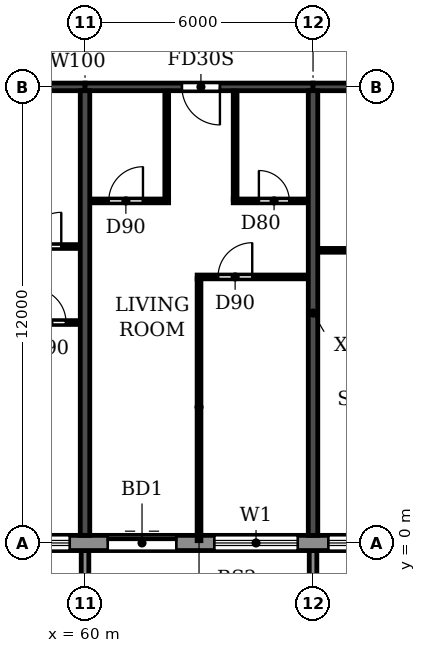
"""IFC4 building model, lengths in metres.
Left out: names, types, materials, properties, quantities, classifications, styles, units other than length and angle.
Written with IfcOpenShell. Run it as: python <this file> out.ifc"""

import sys

from ifc_helpers import new_model, si_unit, direction, frame, frame_2d, origin, place, context, subcontext, project, spatial, polyline, rectangle, outline, extrude, source, transform, mapped, element, fill, save


model = new_model("IFC4")
c1 = context("Model", 3, precision=1e-05, world=origin(), true_north=direction((0.0, 1.0)))
c2 = subcontext(c1, "Body", "Model", "MODEL_VIEW")
j1 = project(units=[si_unit("LENGTHUNIT", "METRE"), si_unit("PLANEANGLEUNIT", "RADIAN")], contexts=[c1])
p1 = place(None, origin())
s1 = spatial("IfcSite", under=j1, at=p1, CompositionType="ELEMENT")
p2 = place(p1, origin())
s2 = spatial("IfcBuilding", under=s1, at=p2, CompositionType="ELEMENT")
p3 = place(p2, frame((0.0, 0.0, 241.2)))
s3 = spatial("IfcBuildingStorey", under=s2, at=p3, CompositionType="ELEMENT", Elevation=241.2)
for number, where, z_axis, x_axis in (
    (1, (60.0, 0.2, 0.0), (0.0, 0.0, 1.0), (0.0, 1.0, 0.0)),
    (2, (66.0, 0.2, 0.0), (0.0, 0.0, 1.0), (0.0, 1.0, 0.0)),
):
    element("IfcWall", number, at=place(p3, frame(where, z_axis=z_axis, x_axis=x_axis)), inside=s3, PredefinedType="SHEAR", context=c2, shape_type="SweptSolid", body=[
        extrude(rectangle(XDim=11.7, YDim=0.25, at=frame_2d((5.85, 0.0))), origin(), (0.0, 0.0, 1.0), 3.08),
    ])
p4 = place(p3, frame((54.0, 12.0, 0.0), z_axis=(0.0, 0.0, 1.0), x_axis=(1.0, 0.0, 0.0)))
e3 = element("IfcWall", 3, at=p4, inside=s3, PredefinedType="SHEAR", context=c2, shape_type="SweptSolid", body=[
    extrude(rectangle(XDim=6.0, YDim=0.2, at=frame_2d((3.0, 0.0))), origin(), (0.0, 0.0, 1.0), 2.48),
])
p5 = place(p4, frame((2.45, 0.0, 0.0)))
e4 = element("IfcOpeningElement", 4, at=p5, cuts=e3, PredefinedType="OPENING", context=c2, shape_type="SweptSolid", body=[
    extrude(rectangle(XDim=1.0, YDim=2.1, at=frame_2d((0.5, 1.05))), frame((0.0, 0.11, 0.0), z_axis=(0.0, -1.0, 0.0), x_axis=(1.0, 0.0, 0.0)), (0.0, 0.0, 1.0), 0.22),
])
p6 = place(p3, frame((60.0, 12.0, 0.0), z_axis=(0.0, 0.0, 1.0), x_axis=(1.0, 0.0, 0.0)))
e5 = element("IfcWall", 5, at=p6, inside=s3, PredefinedType="SHEAR", context=c2, shape_type="SweptSolid", body=[
    extrude(rectangle(XDim=6.0, YDim=0.2, at=frame_2d((3.0, 0.0))), origin(), (0.0, 0.0, 1.0), 2.48),
])
p7 = place(p6, frame((2.55, 0.0, 0.0)))
e6 = element("IfcOpeningElement", 6, at=p7, cuts=e5, PredefinedType="OPENING", context=c2, shape_type="SweptSolid", body=[
    extrude(rectangle(XDim=1.0, YDim=2.1, at=frame_2d((0.5, 1.05))), frame((0.0, 0.11, 0.0), z_axis=(0.0, -1.0, 0.0), x_axis=(1.0, 0.0, 0.0)), (0.0, 0.0, 1.0), 0.22),
])
p8 = place(p3, frame((66.0, 12.0, 0.0), z_axis=(0.0, 0.0, 1.0), x_axis=(1.0, 0.0, 0.0)))
e7 = element("IfcWall", 7, at=p8, inside=s3, PredefinedType="SHEAR", context=c2, shape_type="SweptSolid", body=[
    extrude(rectangle(XDim=6.0, YDim=0.2, at=frame_2d((3.0, 0.0))), origin(), (0.0, 0.0, 1.0), 2.48),
])
p9 = place(p8, frame((2.55, 0.0, 0.0)))
e8 = element("IfcOpeningElement", 8, at=p9, cuts=e7, PredefinedType="OPENING", context=c2, shape_type="SweptSolid", body=[
    extrude(rectangle(XDim=1.0, YDim=2.1, at=frame_2d((0.5, 1.05))), frame((0.0, 0.11, 0.0), z_axis=(0.0, -1.0, 0.0), x_axis=(1.0, 0.0, 0.0)), (0.0, 0.0, 1.0), 0.22),
])
p10 = place(p3, frame((22.683, 0.0, 0.0), z_axis=(0.0, 0.0, 1.0), x_axis=(1.0, 0.0, 0.0)))
e9 = element("IfcWall", 9, at=p10, inside=s3, PredefinedType="STANDARD", context=c2, shape_type="SweptSolid", body=[
    extrude(rectangle(XDim=56.634, YDim=0.4, at=frame_2d((28.317, 0.0))), origin(), (0.0, 0.0, 1.0), 3.08),
])
p11 = place(p10, frame((1.717, 0.0, 0.9)))
e10 = element("IfcOpeningElement", 10, at=p11, cuts=e9, PredefinedType="OPENING", context=c2, shape_type="SweptSolid", body=[
    extrude(rectangle(XDim=2.2, YDim=1.5, at=frame_2d((1.1, 0.75))), frame((0.0, 0.21, 0.0), z_axis=(0.0, -1.0, 0.0), x_axis=(1.0, 0.0, 0.0)), (0.0, 0.0, 1.0), 0.42),
])
p12 = place(p10, frame((4.917, 0.0, 0.0)))
e11 = element("IfcOpeningElement", 11, at=p12, cuts=e9, PredefinedType="OPENING", context=c2, shape_type="SweptSolid", body=[
    extrude(rectangle(XDim=1.8, YDim=2.4, at=frame_2d((0.9, 1.2))), frame((0.0, 0.21, 0.0), z_axis=(0.0, -1.0, 0.0), x_axis=(1.0, 0.0, 0.0)), (0.0, 0.0, 1.0), 0.42),
])
p13 = place(p10, frame((7.717, 0.0, 0.9)))
e12 = element("IfcOpeningElement", 12, at=p13, cuts=e9, PredefinedType="OPENING", context=c2, shape_type="SweptSolid", body=[
    extrude(rectangle(XDim=2.2, YDim=1.5, at=frame_2d((1.1, 0.75))), frame((0.0, 0.21, 0.0), z_axis=(0.0, -1.0, 0.0), x_axis=(1.0, 0.0, 0.0)), (0.0, 0.0, 1.0), 0.42),
])
p14 = place(p10, frame((10.717, 0.0, 0.9)))
e13 = element("IfcOpeningElement", 13, at=p14, cuts=e9, PredefinedType="OPENING", context=c2, shape_type="SweptSolid", body=[
    extrude(rectangle(XDim=2.2, YDim=1.5, at=frame_2d((1.1, 0.75))), frame((0.0, 0.21, 0.0), z_axis=(0.0, -1.0, 0.0), x_axis=(1.0, 0.0, 0.0)), (0.0, 0.0, 1.0), 0.42),
])
p15 = place(p10, frame((13.717, 0.0, 0.9)))
e14 = element("IfcOpeningElement", 14, at=p15, cuts=e9, PredefinedType="OPENING", context=c2, shape_type="SweptSolid", body=[
    extrude(rectangle(XDim=2.2, YDim=1.5, at=frame_2d((1.1, 0.75))), frame((0.0, 0.21, 0.0), z_axis=(0.0, -1.0, 0.0), x_axis=(1.0, 0.0, 0.0)), (0.0, 0.0, 1.0), 0.42),
])
p16 = place(p10, frame((16.917, 0.0, 0.0)))
e15 = element("IfcOpeningElement", 15, at=p16, cuts=e9, PredefinedType="OPENING", context=c2, shape_type="SweptSolid", body=[
    extrude(rectangle(XDim=1.8, YDim=2.4, at=frame_2d((0.9, 1.2))), frame((0.0, 0.21, 0.0), z_axis=(0.0, -1.0, 0.0), x_axis=(1.0, 0.0, 0.0)), (0.0, 0.0, 1.0), 0.42),
])
p17 = place(p10, frame((19.717, 0.0, 0.9)))
e16 = element("IfcOpeningElement", 16, at=p17, cuts=e9, PredefinedType="OPENING", context=c2, shape_type="SweptSolid", body=[
    extrude(rectangle(XDim=2.2, YDim=1.5, at=frame_2d((1.1, 0.75))), frame((0.0, 0.21, 0.0), z_axis=(0.0, -1.0, 0.0), x_axis=(1.0, 0.0, 0.0)), (0.0, 0.0, 1.0), 0.42),
])
p18 = place(p10, frame((22.717, 0.0, 0.9)))
e17 = element("IfcOpeningElement", 17, at=p18, cuts=e9, PredefinedType="OPENING", context=c2, shape_type="SweptSolid", body=[
    extrude(rectangle(XDim=2.2, YDim=1.5, at=frame_2d((1.1, 0.75))), frame((0.0, 0.21, 0.0), z_axis=(0.0, -1.0, 0.0), x_axis=(1.0, 0.0, 0.0)), (0.0, 0.0, 1.0), 0.42),
])
p19 = place(p10, frame((25.717, 0.0, 0.9)))
e18 = element("IfcOpeningElement", 18, at=p19, cuts=e9, PredefinedType="OPENING", context=c2, shape_type="SweptSolid", body=[
    extrude(rectangle(XDim=2.2, YDim=1.5, at=frame_2d((1.1, 0.75))), frame((0.0, 0.21, 0.0), z_axis=(0.0, -1.0, 0.0), x_axis=(1.0, 0.0, 0.0)), (0.0, 0.0, 1.0), 0.42),
])
p20 = place(p10, frame((28.717, 0.0, 0.9)))
e19 = element("IfcOpeningElement", 19, at=p20, cuts=e9, PredefinedType="OPENING", context=c2, shape_type="SweptSolid", body=[
    extrude(rectangle(XDim=2.2, YDim=1.5, at=frame_2d((1.1, 0.75))), frame((0.0, 0.21, 0.0), z_axis=(0.0, -1.0, 0.0), x_axis=(1.0, 0.0, 0.0)), (0.0, 0.0, 1.0), 0.42),
])
p21 = place(p10, frame((31.717, 0.0, 0.9)))
e20 = element("IfcOpeningElement", 20, at=p21, cuts=e9, PredefinedType="OPENING", context=c2, shape_type="SweptSolid", body=[
    extrude(rectangle(XDim=2.2, YDim=1.5, at=frame_2d((1.1, 0.75))), frame((0.0, 0.21, 0.0), z_axis=(0.0, -1.0, 0.0), x_axis=(1.0, 0.0, 0.0)), (0.0, 0.0, 1.0), 0.42),
])
p22 = place(p10, frame((34.717, 0.0, 0.9)))
e21 = element("IfcOpeningElement", 21, at=p22, cuts=e9, PredefinedType="OPENING", context=c2, shape_type="SweptSolid", body=[
    extrude(rectangle(XDim=2.2, YDim=1.5, at=frame_2d((1.1, 0.75))), frame((0.0, 0.21, 0.0), z_axis=(0.0, -1.0, 0.0), x_axis=(1.0, 0.0, 0.0)), (0.0, 0.0, 1.0), 0.42),
])
p23 = place(p10, frame((37.917, 0.0, 0.0)))
e22 = element("IfcOpeningElement", 22, at=p23, cuts=e9, PredefinedType="OPENING", context=c2, shape_type="SweptSolid", body=[
    extrude(rectangle(XDim=1.8, YDim=2.4, at=frame_2d((0.9, 1.2))), frame((0.0, 0.21, 0.0), z_axis=(0.0, -1.0, 0.0), x_axis=(1.0, 0.0, 0.0)), (0.0, 0.0, 1.0), 0.42),
])
p24 = place(p10, frame((40.717, 0.0, 0.9)))
e23 = element("IfcOpeningElement", 23, at=p24, cuts=e9, PredefinedType="OPENING", context=c2, shape_type="SweptSolid", body=[
    extrude(rectangle(XDim=2.2, YDim=1.5, at=frame_2d((1.1, 0.75))), frame((0.0, 0.21, 0.0), z_axis=(0.0, -1.0, 0.0), x_axis=(1.0, 0.0, 0.0)), (0.0, 0.0, 1.0), 0.42),
])
p25 = place(p10, frame((43.717, 0.0, 0.9)))
e24 = element("IfcOpeningElement", 24, at=p25, cuts=e9, PredefinedType="OPENING", context=c2, shape_type="SweptSolid", body=[
    extrude(rectangle(XDim=2.2, YDim=1.5, at=frame_2d((1.1, 0.75))), frame((0.0, 0.21, 0.0), z_axis=(0.0, -1.0, 0.0), x_axis=(1.0, 0.0, 0.0)), (0.0, 0.0, 1.0), 0.42),
])
p26 = place(p10, frame((46.717, 0.0, 0.9)))
e25 = element("IfcOpeningElement", 25, at=p26, cuts=e9, PredefinedType="OPENING", context=c2, shape_type="SweptSolid", body=[
    extrude(rectangle(XDim=2.2, YDim=1.5, at=frame_2d((1.1, 0.75))), frame((0.0, 0.21, 0.0), z_axis=(0.0, -1.0, 0.0), x_axis=(1.0, 0.0, 0.0)), (0.0, 0.0, 1.0), 0.42),
])
p27 = place(p10, frame((49.717, 0.0, 0.9)))
e26 = element("IfcOpeningElement", 26, at=p27, cuts=e9, PredefinedType="OPENING", context=c2, shape_type="SweptSolid", body=[
    extrude(rectangle(XDim=2.2, YDim=1.5, at=frame_2d((1.1, 0.75))), frame((0.0, 0.21, 0.0), z_axis=(0.0, -1.0, 0.0), x_axis=(1.0, 0.0, 0.0)), (0.0, 0.0, 1.0), 0.42),
])
p28 = place(p10, frame((52.917, 0.0, 0.0)))
e27 = element("IfcOpeningElement", 27, at=p28, cuts=e9, PredefinedType="OPENING", context=c2, shape_type="SweptSolid", body=[
    extrude(rectangle(XDim=1.8, YDim=2.4, at=frame_2d((0.9, 1.2))), frame((0.0, 0.21, 0.0), z_axis=(0.0, -1.0, 0.0), x_axis=(1.0, 0.0, 0.0)), (0.0, 0.0, 1.0), 0.42),
])
m1 = source(origin(), c2, "Body", "SweptSolid", [
    extrude(outline(polyline([(0.0, 0.0), (0.2, 0.0), (0.2, 1.65), (0.0, 1.65), (0.0, 0.0)])), origin(), (0.0, 0.0, 1.0), 3.1),
])
for number, where in (
    (28, (59.9, -1.85, 0.0)),
    (29, (65.9, -1.85, 0.0)),
):
    element("IfcWall", number, at=place(p3, frame(where)), inside=s3, PredefinedType="STANDARD", context=c2, shape_type="MappedRepresentation", body=[
        mapped(m1, transform((0.0, 0.0, 0.0))),
    ])
p29 = place(p3, frame((56.95, 5.8, 0.0), z_axis=(0.0, 0.0, 1.0), x_axis=(1.0, 0.0, 0.0)))
e30 = element("IfcWall", 30, at=p29, inside=s3, PredefinedType="PARTITIONING", context=c2, shape_type="SweptSolid", body=[
    extrude(rectangle(XDim=2.915, YDim=0.1, at=frame_2d((1.458, 0.0))), origin(), (0.0, 0.0, 1.0), 3.08),
])
p30 = place(p29, frame((1.65, 0.0, 0.0)))
e31 = element("IfcOpeningElement", 31, at=p30, cuts=e30, PredefinedType="OPENING", context=c2, shape_type="SweptSolid", body=[
    extrude(rectangle(XDim=0.9, YDim=2.1, at=frame_2d((0.45, 1.05))), frame((0.0, 0.06, 0.0), z_axis=(0.0, -1.0, 0.0), x_axis=(1.0, 0.0, 0.0)), (0.0, 0.0, 1.0), 0.12),
])
p31 = place(p3, frame((62.95, 7.0, 0.0), z_axis=(0.0, 0.0, 1.0), x_axis=(1.0, 0.0, 0.0)))
e32 = element("IfcWall", 32, at=p31, inside=s3, PredefinedType="PARTITIONING", context=c2, shape_type="SweptSolid", body=[
    extrude(rectangle(XDim=2.915, YDim=0.1, at=frame_2d((1.458, 0.0))), origin(), (0.0, 0.0, 1.0), 3.08),
])
p32 = place(p31, frame((0.55, 0.0, 0.0)))
e33 = element("IfcOpeningElement", 33, at=p32, cuts=e32, PredefinedType="OPENING", context=c2, shape_type="SweptSolid", body=[
    extrude(rectangle(XDim=0.9, YDim=2.1, at=frame_2d((0.45, 1.05))), frame((0.0, 0.06, 0.0), z_axis=(0.0, -1.0, 0.0), x_axis=(1.0, 0.0, 0.0)), (0.0, 0.0, 1.0), 0.12),
])
p33 = place(p3, frame((66.135, 7.7, 0.0), z_axis=(0.0, 0.0, 1.0), x_axis=(1.0, 0.0, 0.0)))
e34 = element("IfcWall", 34, at=p33, inside=s3, PredefinedType="PARTITIONING", context=c2, shape_type="SweptSolid", body=[
    extrude(rectangle(XDim=2.065, YDim=0.1, at=frame_2d((1.032, 0.0))), origin(), (0.0, 0.0, 1.0), 3.08),
])
p34 = place(p3, frame((57.8, 7.8, 0.0), z_axis=(0.0, 0.0, 1.0), x_axis=(1.0, 0.0, 0.0)))
e35 = element("IfcWall", 35, at=p34, inside=s3, PredefinedType="PARTITIONING", context=c2, shape_type="SweptSolid", body=[
    extrude(rectangle(XDim=2.065, YDim=0.1, at=frame_2d((1.032, 0.0))), origin(), (0.0, 0.0, 1.0), 3.08),
])
p35 = place(p34, frame((0.675, 0.0, 0.0)))
e36 = element("IfcOpeningElement", 36, at=p35, cuts=e35, PredefinedType="OPENING", context=c2, shape_type="SweptSolid", body=[
    extrude(rectangle(XDim=0.9, YDim=2.1, at=frame_2d((0.45, 1.05))), frame((0.0, 0.06, 0.0), z_axis=(0.0, -1.0, 0.0), x_axis=(1.0, 0.0, 0.0)), (0.0, 0.0, 1.0), 0.12),
])
p36 = place(p3, frame((60.135, 9.0, 0.0), z_axis=(0.0, 0.0, 1.0), x_axis=(1.0, 0.0, 0.0)))
e37 = element("IfcWall", 37, at=p36, inside=s3, PredefinedType="PARTITIONING", context=c2, shape_type="SweptSolid", body=[
    extrude(rectangle(XDim=2.065, YDim=0.1, at=frame_2d((1.032, 0.0))), origin(), (0.0, 0.0, 1.0), 3.08),
])
p37 = place(p36, frame((0.49, 0.0, 0.0)))
e38 = element("IfcOpeningElement", 38, at=p37, cuts=e37, PredefinedType="OPENING", context=c2, shape_type="SweptSolid", body=[
    extrude(rectangle(XDim=0.9, YDim=2.1, at=frame_2d((0.45, 1.05))), frame((0.0, 0.06, 0.0), z_axis=(0.0, -1.0, 0.0), x_axis=(1.0, 0.0, 0.0)), (0.0, 0.0, 1.0), 0.12),
])
p38 = place(p3, frame((63.9, 9.0, 0.0), z_axis=(0.0, 0.0, 1.0), x_axis=(1.0, 0.0, 0.0)))
e39 = element("IfcWall", 39, at=p38, inside=s3, PredefinedType="PARTITIONING", context=c2, shape_type="SweptSolid", body=[
    extrude(rectangle(XDim=1.965, YDim=0.1, at=frame_2d((0.982, 0.0))), origin(), (0.0, 0.0, 1.0), 3.08),
])
p39 = place(p38, frame((0.675, 0.0, 0.0)))
e40 = element("IfcOpeningElement", 40, at=p39, cuts=e39, PredefinedType="OPENING", context=c2, shape_type="SweptSolid", body=[
    extrude(rectangle(XDim=0.8, YDim=2.1, at=frame_2d((0.4, 1.05))), frame((0.0, 0.06, 0.0), z_axis=(0.0, -1.0, 0.0), x_axis=(1.0, 0.0, 0.0)), (0.0, 0.0, 1.0), 0.12),
])
p40 = place(p3, frame((62.15, 9.05, 0.0), z_axis=(0.0, 0.0, 1.0), x_axis=(0.0, 1.0, 0.0)))
e41 = element("IfcWall", 41, at=p40, inside=s3, PredefinedType="PARTITIONING", context=c2, shape_type="SweptSolid", body=[
    extrude(rectangle(XDim=2.84, YDim=0.1, at=frame_2d((1.42, 0.0))), origin(), (0.0, 0.0, 1.0), 3.08),
])
p41 = place(p3, frame((63.0, 0.06, 0.0), z_axis=(0.0, 0.0, 1.0), x_axis=(0.0, 1.0, 0.0)))
e42 = element("IfcWall", 42, at=p41, inside=s3, PredefinedType="PARTITIONING", context=c2, shape_type="SweptSolid", body=[
    extrude(rectangle(XDim=6.89, YDim=0.1, at=frame_2d((3.445, 0.0))), origin(), (0.0, 0.0, 1.0), 3.08),
])
p42 = place(p3, frame((63.95, 9.05, 0.0), z_axis=(0.0, 0.0, 1.0), x_axis=(0.0, 1.0, 0.0)))
e43 = element("IfcWall", 43, at=p42, inside=s3, PredefinedType="PARTITIONING", context=c2, shape_type="SweptSolid", body=[
    extrude(rectangle(XDim=2.84, YDim=0.1, at=frame_2d((1.42, 0.0))), origin(), (0.0, 0.0, 1.0), 3.08),
])
p43 = place(p22, origin())
e44 = element("IfcWindow", 44, at=p43, inside=s3, PartitioningType="DOUBLE_PANEL_HORIZONTAL", PredefinedType="WINDOW", context=c2, shape_type="SweptSolid", body=[
    extrude(rectangle(XDim=2.2, YDim=1.5, at=frame_2d((1.1, 0.75))), frame((0.0, 0.03, 0.0), z_axis=(0.0, -1.0, 0.0), x_axis=(1.0, 0.0, 0.0)), (0.0, 0.0, 1.0), 0.06),
])
fill(e21, e44)
p44 = place(p23, origin())
e45 = element("IfcDoor", 45, at=p44, inside=s3, OperationType="DOUBLE_DOOR_SLIDING", PredefinedType="DOOR", context=c2, shape_type="SweptSolid", body=[
    extrude(rectangle(XDim=1.8, YDim=2.4, at=frame_2d((0.9, 1.2))), frame((0.0, 0.025, 0.0), z_axis=(0.0, -1.0, 0.0), x_axis=(1.0, 0.0, 0.0)), (0.0, 0.0, 1.0), 0.05),
])
fill(e22, e45)
p45 = place(p24, origin())
e46 = element("IfcWindow", 46, at=p45, inside=s3, PartitioningType="DOUBLE_PANEL_HORIZONTAL", PredefinedType="WINDOW", context=c2, shape_type="SweptSolid", body=[
    extrude(rectangle(XDim=2.2, YDim=1.5, at=frame_2d((1.1, 0.75))), frame((0.0, 0.03, 0.0), z_axis=(0.0, -1.0, 0.0), x_axis=(1.0, 0.0, 0.0)), (0.0, 0.0, 1.0), 0.06),
])
fill(e23, e46)
p46 = place(p25, origin())
e47 = element("IfcWindow", 47, at=p46, inside=s3, PartitioningType="DOUBLE_PANEL_HORIZONTAL", PredefinedType="WINDOW", context=c2, shape_type="SweptSolid", body=[
    extrude(rectangle(XDim=2.2, YDim=1.5, at=frame_2d((1.1, 0.75))), frame((0.0, 0.03, 0.0), z_axis=(0.0, -1.0, 0.0), x_axis=(1.0, 0.0, 0.0)), (0.0, 0.0, 1.0), 0.06),
])
fill(e24, e47)
p47 = place(p35, origin())
e48 = element("IfcDoor", 48, at=p47, inside=s3, OperationType="SINGLE_SWING_RIGHT", PredefinedType="DOOR", context=c2, shape_type="SweptSolid", body=[
    extrude(rectangle(XDim=0.9, YDim=2.1, at=frame_2d((0.45, 1.05))), frame((0.0, 0.025, 0.0), z_axis=(0.0, -1.0, 0.0), x_axis=(1.0, 0.0, 0.0)), (0.0, 0.0, 1.0), 0.05),
])
fill(e36, e48)
p48 = place(p30, origin())
e49 = element("IfcDoor", 49, at=p48, inside=s3, OperationType="SINGLE_SWING_LEFT", PredefinedType="DOOR", context=c2, shape_type="SweptSolid", body=[
    extrude(rectangle(XDim=0.9, YDim=2.1, at=frame_2d((0.45, 1.05))), frame((0.0, 0.025, 0.0), z_axis=(0.0, -1.0, 0.0), x_axis=(1.0, 0.0, 0.0)), (0.0, 0.0, 1.0), 0.05),
])
fill(e31, e49)
p49 = place(p37, origin())
e50 = element("IfcDoor", 50, at=p49, inside=s3, OperationType="SINGLE_SWING_RIGHT", PredefinedType="DOOR", context=c2, shape_type="SweptSolid", body=[
    extrude(rectangle(XDim=0.9, YDim=2.1, at=frame_2d((0.45, 1.05))), frame((0.0, 0.025, 0.0), z_axis=(0.0, -1.0, 0.0), x_axis=(1.0, 0.0, 0.0)), (0.0, 0.0, 1.0), 0.05),
])
fill(e38, e50)
p50 = place(p7, frame((1.0, 0.0, 0.0), z_axis=(0.0, 0.0, 1.0), x_axis=(-1.0, 0.0, 0.0)))
e51 = element("IfcDoor", 51, at=p50, inside=s3, OperationType="SINGLE_SWING_LEFT", PredefinedType="DOOR", context=c2, shape_type="SweptSolid", body=[
    extrude(rectangle(XDim=1.0, YDim=2.1, at=frame_2d((0.5, 1.05))), frame((0.0, 0.025, 0.0), z_axis=(0.0, -1.0, 0.0), x_axis=(1.0, 0.0, 0.0)), (0.0, 0.0, 1.0), 0.05),
])
fill(e6, e51)
p51 = place(p32, origin())
e52 = element("IfcDoor", 52, at=p51, inside=s3, OperationType="SINGLE_SWING_RIGHT", PredefinedType="DOOR", context=c2, shape_type="SweptSolid", body=[
    extrude(rectangle(XDim=0.9, YDim=2.1, at=frame_2d((0.45, 1.05))), frame((0.0, 0.025, 0.0), z_axis=(0.0, -1.0, 0.0), x_axis=(1.0, 0.0, 0.0)), (0.0, 0.0, 1.0), 0.05),
])
fill(e33, e52)
p52 = place(p39, origin())
e53 = element("IfcDoor", 53, at=p52, inside=s3, OperationType="SINGLE_SWING_LEFT", PredefinedType="DOOR", context=c2, shape_type="SweptSolid", body=[
    extrude(rectangle(XDim=0.8, YDim=2.1, at=frame_2d((0.4, 1.05))), frame((0.0, 0.025, 0.0), z_axis=(0.0, -1.0, 0.0), x_axis=(1.0, 0.0, 0.0)), (0.0, 0.0, 1.0), 0.05),
])
fill(e40, e53)
save(model, sys.argv[1])
